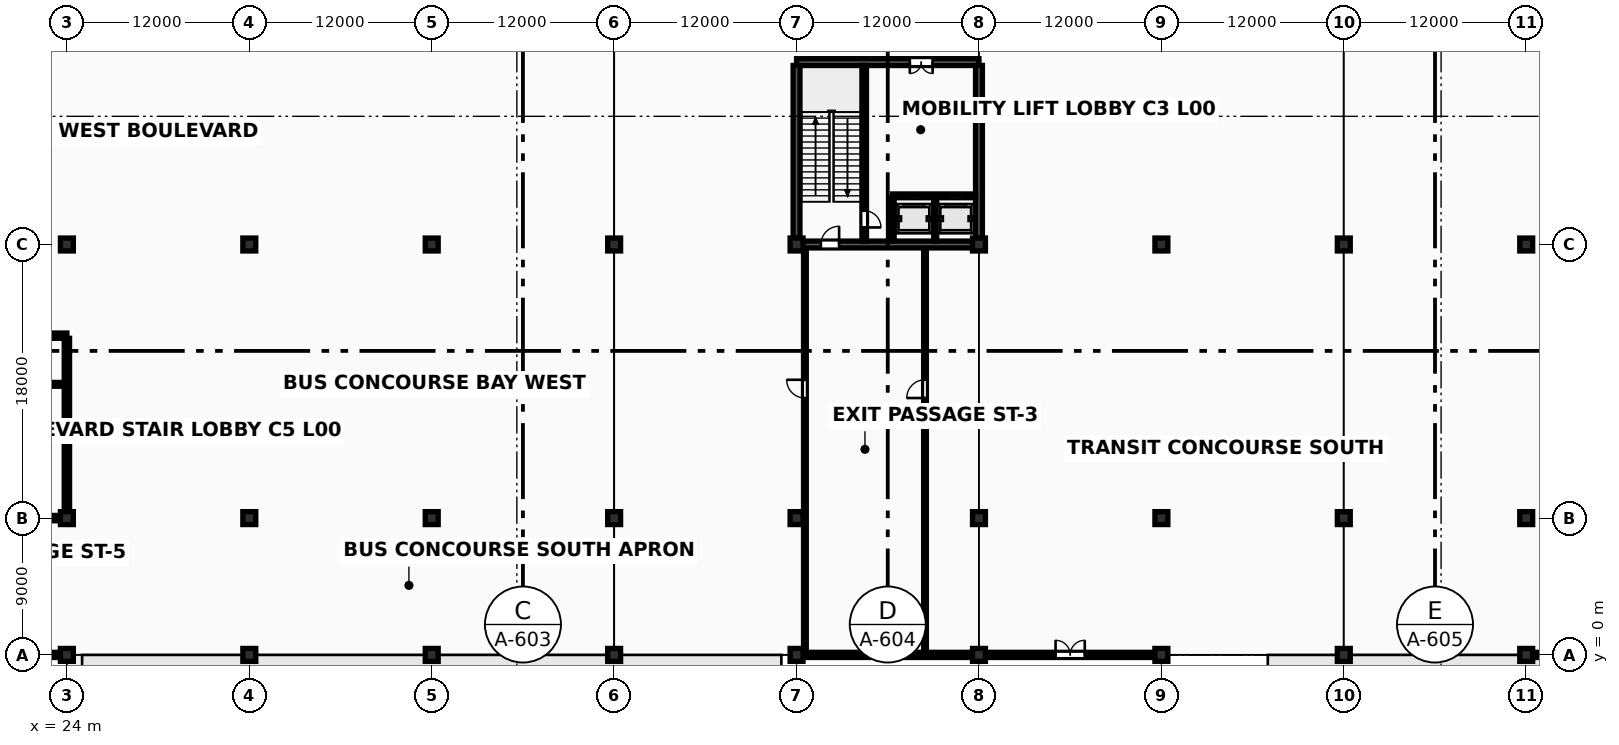
"""IFC4 building model, lengths in metres.
Left out: names, types, materials, properties, quantities, classifications, styles, units other than length and angle.
Written with IfcOpenShell. Run it as: python <this file> out.ifc"""

import sys

from ifc_helpers import new_model, si_unit, direction, frame, frame_2d, origin, origin_2d, place, context, subcontext, project, spatial, rectangle, circle, extrude, element, fill, save


model = new_model("IFC4")
c1 = context("Model", 3, precision=1e-05, world=origin(), true_north=direction((0.0, 1.0)))
c2 = subcontext(c1, "Body", "Model", "MODEL_VIEW")
j1 = project(units=[si_unit("LENGTHUNIT", "METRE"), si_unit("PLANEANGLEUNIT", "RADIAN")], contexts=[c1])
p1 = place(None, origin())
s1 = spatial("IfcSite", under=j1, at=p1, CompositionType="ELEMENT")
p2 = place(p1, origin())
s2 = spatial("IfcBuilding", under=s1, at=p2, CompositionType="ELEMENT")
p3 = place(p2, origin())
s3 = spatial("IfcBuildingStorey", under=s2, at=p3, CompositionType="ELEMENT", Elevation=0.0)
p4 = place(p3, frame((24.0, 0.0, 0.0), z_axis=(0.0, 0.0, 1.0), x_axis=(1.0, 0.0, 0.0)))
e1 = element("IfcColumn", 1, at=p4, inside=s3, PredefinedType="COLUMN", context=c2, shape_type="SweptSolid", body=[
    extrude(circle(Radius=0.425, at=origin_2d()), origin(), (0.0, 0.0, 1.0), 5.4),
])
for number, where, z_axis, x_axis in (
    (2, (24.0, 9.0, 0.0), (0.0, 0.0, 1.0), (1.0, 0.0, 0.0)),
    (3, (24.0, 27.0, 0.0), (0.0, 0.0, 1.0), (1.0, 0.0, 0.0)),
):
    element("IfcColumn", number, at=place(p3, frame(where, z_axis=z_axis, x_axis=x_axis)), inside=s3, PredefinedType="COLUMN", context=c2, shape_type="SweptSolid", body=[
        extrude(rectangle(XDim=0.85, YDim=0.85, at=origin_2d()), origin(), (0.0, 0.0, 1.0), 5.4),
    ])
p5 = place(p3, frame((36.0, 0.0, 0.0), z_axis=(0.0, 0.0, 1.0), x_axis=(1.0, 0.0, 0.0)))
e4 = element("IfcColumn", 4, at=p5, inside=s3, PredefinedType="COLUMN", context=c2, shape_type="SweptSolid", body=[
    extrude(circle(Radius=0.425, at=origin_2d()), origin(), (0.0, 0.0, 1.0), 5.4),
])
for number, where, z_axis, x_axis in (
    (5, (36.0, 9.0, 0.0), (0.0, 0.0, 1.0), (1.0, 0.0, 0.0)),
    (6, (36.0, 27.0, 0.0), (0.0, 0.0, 1.0), (1.0, 0.0, 0.0)),
):
    element("IfcColumn", number, at=place(p3, frame(where, z_axis=z_axis, x_axis=x_axis)), inside=s3, PredefinedType="COLUMN", context=c2, shape_type="SweptSolid", body=[
        extrude(rectangle(XDim=0.85, YDim=0.85, at=origin_2d()), origin(), (0.0, 0.0, 1.0), 5.4),
    ])
p6 = place(p3, frame((48.0, 0.0, 0.0), z_axis=(0.0, 0.0, 1.0), x_axis=(1.0, 0.0, 0.0)))
e7 = element("IfcColumn", 7, at=p6, inside=s3, PredefinedType="COLUMN", context=c2, shape_type="SweptSolid", body=[
    extrude(circle(Radius=0.425, at=origin_2d()), origin(), (0.0, 0.0, 1.0), 5.4),
])
for number, where, z_axis, x_axis in (
    (8, (48.0, 9.0, 0.0), (0.0, 0.0, 1.0), (1.0, 0.0, 0.0)),
    (9, (48.0, 27.0, 0.0), (0.0, 0.0, 1.0), (1.0, 0.0, 0.0)),
):
    element("IfcColumn", number, at=place(p3, frame(where, z_axis=z_axis, x_axis=x_axis)), inside=s3, PredefinedType="COLUMN", context=c2, shape_type="SweptSolid", body=[
        extrude(rectangle(XDim=0.85, YDim=0.85, at=origin_2d()), origin(), (0.0, 0.0, 1.0), 5.4),
    ])
p7 = place(p3, frame((60.0, 0.0, 0.0), z_axis=(0.0, 0.0, 1.0), x_axis=(1.0, 0.0, 0.0)))
e10 = element("IfcColumn", 10, at=p7, inside=s3, PredefinedType="COLUMN", context=c2, shape_type="SweptSolid", body=[
    extrude(circle(Radius=0.425, at=origin_2d()), origin(), (0.0, 0.0, 1.0), 5.4),
])
for number, where, z_axis, x_axis in (
    (11, (60.0, 9.0, 0.0), (0.0, 0.0, 1.0), (1.0, 0.0, 0.0)),
    (12, (60.0, 27.0, 0.0), (0.0, 0.0, 1.0), (1.0, 0.0, 0.0)),
):
    element("IfcColumn", number, at=place(p3, frame(where, z_axis=z_axis, x_axis=x_axis)), inside=s3, PredefinedType="COLUMN", context=c2, shape_type="SweptSolid", body=[
        extrude(rectangle(XDim=0.85, YDim=0.85, at=origin_2d()), origin(), (0.0, 0.0, 1.0), 5.4),
    ])
p8 = place(p3, frame((72.0, 0.0, 0.0), z_axis=(0.0, 0.0, 1.0), x_axis=(1.0, 0.0, 0.0)))
e13 = element("IfcColumn", 13, at=p8, inside=s3, PredefinedType="COLUMN", context=c2, shape_type="SweptSolid", body=[
    extrude(circle(Radius=0.425, at=origin_2d()), origin(), (0.0, 0.0, 1.0), 5.4),
])
for number, where, z_axis, x_axis in (
    (14, (72.0, 9.0, 0.0), (0.0, 0.0, 1.0), (1.0, 0.0, 0.0)),
    (15, (72.0, 27.0, 0.0), (0.0, 0.0, 1.0), (1.0, 0.0, 0.0)),
):
    element("IfcColumn", number, at=place(p3, frame(where, z_axis=z_axis, x_axis=x_axis)), inside=s3, PredefinedType="COLUMN", context=c2, shape_type="SweptSolid", body=[
        extrude(rectangle(XDim=0.85, YDim=0.85, at=origin_2d()), origin(), (0.0, 0.0, 1.0), 5.4),
    ])
p9 = place(p3, frame((84.0, 0.0, 0.0), z_axis=(0.0, 0.0, 1.0), x_axis=(1.0, 0.0, 0.0)))
e16 = element("IfcColumn", 16, at=p9, inside=s3, PredefinedType="COLUMN", context=c2, shape_type="SweptSolid", body=[
    extrude(circle(Radius=0.425, at=origin_2d()), origin(), (0.0, 0.0, 1.0), 5.4),
])
for number, where, z_axis, x_axis in (
    (17, (84.0, 9.0, 0.0), (0.0, 0.0, 1.0), (1.0, 0.0, 0.0)),
    (18, (84.0, 27.0, 0.0), (0.0, 0.0, 1.0), (1.0, 0.0, 0.0)),
):
    element("IfcColumn", number, at=place(p3, frame(where, z_axis=z_axis, x_axis=x_axis)), inside=s3, PredefinedType="COLUMN", context=c2, shape_type="SweptSolid", body=[
        extrude(rectangle(XDim=0.85, YDim=0.85, at=origin_2d()), origin(), (0.0, 0.0, 1.0), 5.4),
    ])
p10 = place(p3, frame((96.0, 0.0, 0.0), z_axis=(0.0, 0.0, 1.0), x_axis=(1.0, 0.0, 0.0)))
e19 = element("IfcColumn", 19, at=p10, inside=s3, PredefinedType="COLUMN", context=c2, shape_type="SweptSolid", body=[
    extrude(circle(Radius=0.425, at=origin_2d()), origin(), (0.0, 0.0, 1.0), 5.4),
])
for number, where, z_axis, x_axis in (
    (20, (96.0, 9.0, 0.0), (0.0, 0.0, 1.0), (1.0, 0.0, 0.0)),
    (21, (96.0, 27.0, 0.0), (0.0, 0.0, 1.0), (1.0, 0.0, 0.0)),
):
    element("IfcColumn", number, at=place(p3, frame(where, z_axis=z_axis, x_axis=x_axis)), inside=s3, PredefinedType="COLUMN", context=c2, shape_type="SweptSolid", body=[
        extrude(rectangle(XDim=0.85, YDim=0.85, at=origin_2d()), origin(), (0.0, 0.0, 1.0), 5.4),
    ])
p11 = place(p3, frame((108.0, 0.0, 0.0), z_axis=(0.0, 0.0, 1.0), x_axis=(1.0, 0.0, 0.0)))
e22 = element("IfcColumn", 22, at=p11, inside=s3, PredefinedType="COLUMN", context=c2, shape_type="SweptSolid", body=[
    extrude(circle(Radius=0.425, at=origin_2d()), origin(), (0.0, 0.0, 1.0), 5.4),
])
for number, where, z_axis, x_axis in (
    (23, (108.0, 9.0, 0.0), (0.0, 0.0, 1.0), (1.0, 0.0, 0.0)),
    (24, (108.0, 27.0, 0.0), (0.0, 0.0, 1.0), (1.0, 0.0, 0.0)),
):
    element("IfcColumn", number, at=place(p3, frame(where, z_axis=z_axis, x_axis=x_axis)), inside=s3, PredefinedType="COLUMN", context=c2, shape_type="SweptSolid", body=[
        extrude(rectangle(XDim=0.85, YDim=0.85, at=origin_2d()), origin(), (0.0, 0.0, 1.0), 5.4),
    ])
p12 = place(p3, frame((120.0, 0.0, 0.0), z_axis=(0.0, 0.0, 1.0), x_axis=(1.0, 0.0, 0.0)))
e25 = element("IfcColumn", 25, at=p12, inside=s3, PredefinedType="COLUMN", context=c2, shape_type="SweptSolid", body=[
    extrude(circle(Radius=0.425, at=origin_2d()), origin(), (0.0, 0.0, 1.0), 5.4),
])
for number, where, z_axis, x_axis in (
    (26, (120.0, 9.0, 0.0), (0.0, 0.0, 1.0), (1.0, 0.0, 0.0)),
    (27, (120.0, 27.0, 0.0), (0.0, 0.0, 1.0), (1.0, 0.0, 0.0)),
):
    element("IfcColumn", number, at=place(p3, frame(where, z_axis=z_axis, x_axis=x_axis)), inside=s3, PredefinedType="COLUMN", context=c2, shape_type="SweptSolid", body=[
        extrude(rectangle(XDim=0.85, YDim=0.85, at=origin_2d()), origin(), (0.0, 0.0, 1.0), 5.4),
    ])
p13 = place(p3, frame((72.422, 27.0, 0.0), z_axis=(0.0, 0.0, 1.0), x_axis=(1.0, 0.0, 0.0)))
e28 = element("IfcWall", 28, at=p13, inside=s3, PredefinedType="SHEAR", context=c2, shape_type="SweptSolid", body=[
    extrude(rectangle(XDim=11.156, YDim=0.45, at=frame_2d((5.578, 0.0))), origin(), (0.0, 0.0, 1.0), 5.203),
])
p14 = place(p13, frame((1.178, 0.0, 0.0)))
e29 = element("IfcOpeningElement", 29, at=p14, cuts=e28, PredefinedType="OPENING", context=c2, shape_type="SweptSolid", body=[
    extrude(rectangle(XDim=1.2, YDim=2.2, at=frame_2d((0.6, 1.1))), frame((0.0, 0.24, 0.0), z_axis=(0.0, -1.0, 0.0), x_axis=(1.0, 0.0, 0.0)), (0.0, 0.0, 1.0), 0.48),
])
p15 = place(p3, frame((72.0, 39.0, 0.0), z_axis=(0.0, 0.0, 1.0), x_axis=(1.0, 0.0, 0.0)))
e30 = element("IfcWall", 30, at=p15, inside=s3, PredefinedType="SHEAR", context=c2, shape_type="SweptSolid", body=[
    extrude(rectangle(XDim=12.0, YDim=0.45, at=frame_2d((6.0, 0.0))), origin(), (0.0, 0.0, 1.0), 5.203),
])
p16 = place(p15, frame((7.45, 0.0, 0.0)))
e31 = element("IfcOpeningElement", 31, at=p16, cuts=e30, PredefinedType="OPENING", context=c2, shape_type="SweptSolid", body=[
    extrude(rectangle(XDim=1.5, YDim=2.25, at=frame_2d((0.75, 1.125))), frame((0.0, 0.24, 0.0), z_axis=(0.0, -1.0, 0.0), x_axis=(1.0, 0.0, 0.0)), (0.0, 0.0, 1.0), 0.48),
])
for number, where, z_axis, x_axis in (
    (32, (72.0, 27.422, 0.0), (0.0, 0.0, 1.0), (0.0, 1.0, 0.0)),
    (33, (84.0, 27.422, 0.0), (0.0, 0.0, 1.0), (0.0, 1.0, 0.0)),
):
    element("IfcWall", number, at=place(p3, frame(where, z_axis=z_axis, x_axis=x_axis)), inside=s3, PredefinedType="SHEAR", context=c2, shape_type="SweptSolid", body=[
        extrude(rectangle(XDim=11.356, YDim=0.45, at=frame_2d((5.678, 0.0))), origin(), (0.0, 0.0, 1.0), 5.203),
    ])
p17 = place(p3, frame((76.45, 27.222, 0.0), z_axis=(0.0, 0.0, 1.0), x_axis=(0.0, 1.0, 0.0)))
e34 = element("IfcWall", 34, at=p17, inside=s3, PredefinedType="SHEAR", context=c2, shape_type="SweptSolid", body=[
    extrude(rectangle(XDim=11.556, YDim=0.3, at=frame_2d((5.778, 0.0))), origin(), (0.0, 0.0, 1.0), 5.203),
])
p18 = place(p17, frame((0.9, 0.0, 0.0)))
e35 = element("IfcOpeningElement", 35, at=p18, cuts=e34, PredefinedType="OPENING", context=c2, shape_type="SweptSolid", body=[
    extrude(rectangle(XDim=1.1, YDim=2.2, at=frame_2d((0.55, 1.1))), frame((0.0, 0.165, 0.0), z_axis=(0.0, -1.0, 0.0), x_axis=(1.0, 0.0, 0.0)), (0.0, 0.0, 1.0), 0.33),
])
p19 = place(p3, frame((78.32, 30.2, 0.0), z_axis=(0.0, 0.0, 1.0), x_axis=(1.0, 0.0, 0.0)))
e36 = element("IfcWall", 36, at=p19, inside=s3, PredefinedType="SOLIDWALL", context=c2, shape_type="SweptSolid", body=[
    extrude(rectangle(XDim=5.458, YDim=0.25, at=frame_2d((2.729, 0.0))), origin(), (0.0, 0.0, 1.0), 5.203),
])
p20 = place(p19, frame((0.86, 0.0, 0.0)))
e37 = element("IfcOpeningElement", 37, at=p20, cuts=e36, PredefinedType="OPENING", context=c2, shape_type="SweptSolid", body=[
    extrude(rectangle(XDim=1.08, YDim=2.22, at=frame_2d((0.54, 1.11))), frame((0.0, 0.14, 0.0), z_axis=(0.0, -1.0, 0.0), x_axis=(1.0, 0.0, 0.0)), (0.0, 0.0, 1.0), 0.28),
])
p21 = place(p19, frame((3.61, 0.0, 0.0)))
e38 = element("IfcOpeningElement", 38, at=p21, cuts=e36, PredefinedType="OPENING", context=c2, shape_type="SweptSolid", body=[
    extrude(rectangle(XDim=1.08, YDim=2.22, at=frame_2d((0.54, 1.11))), frame((0.0, 0.14, 0.0), z_axis=(0.0, -1.0, 0.0), x_axis=(1.0, 0.0, 0.0)), (0.0, 0.0, 1.0), 0.28),
])
for number, where, z_axis, x_axis in (
    (39, (78.32, 27.225, 0.0), (0.0, 0.0, 1.0), (0.0, 1.0, 0.0)),
    (40, (81.12, 27.225, 0.0), (0.0, 0.0, 1.0), (0.0, 1.0, 0.0)),
):
    element("IfcWall", number, at=place(p3, frame(where, z_axis=z_axis, x_axis=x_axis)), inside=s3, PredefinedType="SOLIDWALL", context=c2, shape_type="SweptSolid", body=[
        extrude(rectangle(XDim=2.855, YDim=0.2, at=frame_2d((1.427, 0.0))), origin(), (0.0, 0.0, 1.0), 5.193),
    ])
p22 = place(p3, frame((12.422, 9.0, 0.0), z_axis=(0.0, 0.0, 1.0), x_axis=(1.0, 0.0, 0.0)))
e41 = element("IfcWall", 41, at=p22, inside=s3, PredefinedType="SHEAR", context=c2, shape_type="SweptSolid", body=[
    extrude(rectangle(XDim=11.156, YDim=0.35, at=frame_2d((5.578, 0.0))), origin(), (0.0, 0.0, 1.0), 5.203),
])
p23 = place(p22, frame((1.178, 0.0, 0.0)))
e42 = element("IfcOpeningElement", 42, at=p23, cuts=e41, PredefinedType="OPENING", context=c2, shape_type="SweptSolid", body=[
    extrude(rectangle(XDim=1.2, YDim=2.2, at=frame_2d((0.6, 1.1))), frame((0.0, 0.19, 0.0), z_axis=(0.0, -1.0, 0.0), x_axis=(1.0, 0.0, 0.0)), (0.0, 0.0, 1.0), 0.38),
])
p24 = place(p3, frame((12.0, 21.0, 0.0), z_axis=(0.0, 0.0, 1.0), x_axis=(1.0, 0.0, 0.0)))
e43 = element("IfcWall", 43, at=p24, inside=s3, PredefinedType="SHEAR", context=c2, shape_type="SweptSolid", body=[
    extrude(rectangle(XDim=12.0, YDim=0.35, at=frame_2d((6.0, 0.0))), origin(), (0.0, 0.0, 1.0), 5.203),
])
p25 = place(p24, frame((7.45, 0.0, 0.0)))
e44 = element("IfcOpeningElement", 44, at=p25, cuts=e43, PredefinedType="OPENING", context=c2, shape_type="SweptSolid", body=[
    extrude(rectangle(XDim=1.4, YDim=2.22, at=frame_2d((0.7, 1.11))), frame((0.0, 0.19, 0.0), z_axis=(0.0, -1.0, 0.0), x_axis=(1.0, 0.0, 0.0)), (0.0, 0.0, 1.0), 0.38),
])
p26 = place(p3, frame((24.0, 9.422, 0.0), z_axis=(0.0, 0.0, 1.0), x_axis=(0.0, 1.0, 0.0)))
e45 = element("IfcWall", 45, at=p26, inside=s3, PredefinedType="SHEAR", context=c2, shape_type="SweptSolid", body=[
    extrude(rectangle(XDim=11.406, YDim=0.35, at=frame_2d((5.703, 0.0))), origin(), (0.0, 0.0, 1.0), 5.203),
])
p27 = place(p3, frame((16.597, 17.8, 0.0), z_axis=(0.0, 0.0, 1.0), x_axis=(1.0, 0.0, 0.0)))
e46 = element("IfcWall", 46, at=p27, inside=s3, PredefinedType="SOLIDWALL", context=c2, shape_type="SweptSolid", body=[
    extrude(rectangle(XDim=7.231, YDim=0.25, at=frame_2d((3.615, 0.0))), origin(), (0.0, 0.0, 1.0), 5.203),
])
p28 = place(p3, frame((12.423, 0.0, 0.0), z_axis=(0.0, 0.0, 1.0), x_axis=(1.0, 0.0, 0.0)))
e47 = element("IfcWall", 47, at=p28, inside=s3, PredefinedType="SOLIDWALL", context=c2, shape_type="SweptSolid", body=[
    extrude(rectangle(XDim=11.154, YDim=0.34, at=frame_2d((5.577, 0.0))), origin(), (0.0, 0.0, 1.0), 3.85),
])
p29 = place(p28, frame((4.697, 0.0, 0.0)))
e48 = element("IfcOpeningElement", 48, at=p29, cuts=e47, PredefinedType="OPENING", context=c2, shape_type="SweptSolid", body=[
    extrude(rectangle(XDim=1.76, YDim=2.36, at=frame_2d((0.88, 1.18))), frame((0.0, 0.185, 0.0), z_axis=(0.0, -1.0, 0.0), x_axis=(1.0, 0.0, 0.0)), (0.0, 0.0, 1.0), 0.37),
])
p30 = place(p3, frame((72.423, 0.0, 0.0), z_axis=(0.0, 0.0, 1.0), x_axis=(1.0, 0.0, 0.0)))
e49 = element("IfcWall", 49, at=p30, inside=s3, PredefinedType="SOLIDWALL", context=c2, shape_type="SweptSolid", body=[
    extrude(rectangle(XDim=11.154, YDim=0.34, at=frame_2d((5.577, 0.0))), origin(), (0.0, 0.0, 1.0), 3.85),
])
p31 = place(p30, frame((4.697, 0.0, 0.0)))
e50 = element("IfcOpeningElement", 50, at=p31, cuts=e49, PredefinedType="OPENING", context=c2, shape_type="SweptSolid", body=[
    extrude(rectangle(XDim=1.76, YDim=2.36, at=frame_2d((0.88, 1.18))), frame((0.0, 0.185, 0.0), z_axis=(0.0, -1.0, 0.0), x_axis=(1.0, 0.0, 0.0)), (0.0, 0.0, 1.0), 0.37),
])
p32 = place(p3, frame((84.423, 0.0, 0.0), z_axis=(0.0, 0.0, 1.0), x_axis=(1.0, 0.0, 0.0)))
e51 = element("IfcWall", 51, at=p32, inside=s3, PredefinedType="SOLIDWALL", context=c2, shape_type="SweptSolid", body=[
    extrude(rectangle(XDim=11.154, YDim=0.34, at=frame_2d((5.577, 0.0))), origin(), (0.0, 0.0, 1.0), 3.85),
])
p33 = place(p32, frame((4.617, 0.0, 0.0)))
e52 = element("IfcOpeningElement", 52, at=p33, cuts=e51, PredefinedType="OPENING", context=c2, shape_type="SweptSolid", body=[
    extrude(rectangle(XDim=1.92, YDim=2.4, at=frame_2d((0.96, 1.2))), frame((0.0, 0.185, 0.0), z_axis=(0.0, -1.0, 0.0), x_axis=(1.0, 0.0, 0.0)), (0.0, 0.0, 1.0), 0.37),
])
p34 = place(p3, frame((120.423, 0.0, 0.0), z_axis=(0.0, 0.0, 1.0), x_axis=(1.0, 0.0, 0.0)))
e53 = element("IfcWall", 53, at=p34, inside=s3, PredefinedType="SOLIDWALL", context=c2, shape_type="SweptSolid", body=[
    extrude(rectangle(XDim=11.154, YDim=0.34, at=frame_2d((5.577, 0.0))), origin(), (0.0, 0.0, 1.0), 3.85),
])
p35 = place(p34, frame((4.377, 0.0, 0.0)))
e54 = element("IfcOpeningElement", 54, at=p35, cuts=e53, PredefinedType="OPENING", context=c2, shape_type="SweptSolid", body=[
    extrude(rectangle(XDim=2.4, YDim=2.54, at=frame_2d((1.2, 1.27))), frame((0.0, 0.185, 0.0), z_axis=(0.0, -1.0, 0.0), x_axis=(1.0, 0.0, 0.0)), (0.0, 0.0, 1.0), 0.37),
])
p36 = place(p3, frame((72.55, 0.4, 0.0), z_axis=(0.0, 0.0, 1.0), x_axis=(0.0, 1.0, 0.0)))
e55 = element("IfcWall", 55, at=p36, inside=s3, PredefinedType="SOLIDWALL", context=c2, shape_type="SweptSolid", body=[
    extrude(rectangle(XDim=26.3, YDim=0.18, at=frame_2d((13.15, 0.0))), origin(), (0.0, 0.0, 1.0), 2.6),
])
p37 = place(p36, frame((16.5, 0.0, 0.0)))
e56 = element("IfcOpeningElement", 56, at=p37, cuts=e55, PredefinedType="OPENING", context=c2, shape_type="SweptSolid", body=[
    extrude(rectangle(XDim=1.2, YDim=2.2, at=frame_2d((0.6, 1.1))), frame((0.0, 0.105, 0.0), z_axis=(0.0, -1.0, 0.0), x_axis=(1.0, 0.0, 0.0)), (0.0, 0.0, 1.0), 0.21),
])
p38 = place(p3, frame((80.45, 0.4, 0.0), z_axis=(0.0, 0.0, 1.0), x_axis=(0.0, 1.0, 0.0)))
e57 = element("IfcWall", 57, at=p38, inside=s3, PredefinedType="SOLIDWALL", context=c2, shape_type="SweptSolid", body=[
    extrude(rectangle(XDim=26.3, YDim=0.18, at=frame_2d((13.15, 0.0))), origin(), (0.0, 0.0, 1.0), 2.6),
])
p39 = place(p38, frame((16.5, 0.0, 0.0)))
e58 = element("IfcOpeningElement", 58, at=p39, cuts=e57, PredefinedType="OPENING", context=c2, shape_type="SweptSolid", body=[
    extrude(rectangle(XDim=1.2, YDim=2.2, at=frame_2d((0.6, 1.1))), frame((0.0, 0.105, 0.0), z_axis=(0.0, -1.0, 0.0), x_axis=(1.0, 0.0, 0.0)), (0.0, 0.0, 1.0), 0.21),
])
p40 = place(p31, frame((1.76, 0.0, 0.0), z_axis=(0.0, 0.0, 1.0), x_axis=(-1.0, 0.0, 0.0)))
e59 = element("IfcDoor", 59, at=p40, inside=s3, OperationType="DOUBLE_DOOR_SINGLE_SWING", PredefinedType="DOOR", context=c2, shape_type="SweptSolid", body=[
    extrude(rectangle(XDim=1.76, YDim=2.36, at=frame_2d((0.88, 1.18))), frame((0.0, 0.025, 0.0), z_axis=(0.0, -1.0, 0.0), x_axis=(1.0, 0.0, 0.0)), (0.0, 0.0, 1.0), 0.05),
])
fill(e50, e59)
p41 = place(p33, frame((1.92, 0.0, 0.0), z_axis=(0.0, 0.0, 1.0), x_axis=(-1.0, 0.0, 0.0)))
e60 = element("IfcDoor", 60, at=p41, inside=s3, OperationType="DOUBLE_DOOR_SINGLE_SWING", PredefinedType="DOOR", context=c2, shape_type="SweptSolid", body=[
    extrude(rectangle(XDim=1.92, YDim=2.4, at=frame_2d((0.96, 1.2))), frame((0.0, 0.025, 0.0), z_axis=(0.0, -1.0, 0.0), x_axis=(1.0, 0.0, 0.0)), (0.0, 0.0, 1.0), 0.05),
])
fill(e52, e60)
p42 = place(p18, origin())
e61 = element("IfcDoor", 61, at=p42, inside=s3, OperationType="SINGLE_SWING_LEFT", PredefinedType="DOOR", context=c2, shape_type="SweptSolid", body=[
    extrude(rectangle(XDim=1.1, YDim=2.2, at=frame_2d((0.55, 1.1))), frame((0.0, 0.025, 0.0), z_axis=(0.0, -1.0, 0.0), x_axis=(1.0, 0.0, 0.0)), (0.0, 0.0, 1.0), 0.05),
])
fill(e35, e61)
p43 = place(p16, origin())
e62 = element("IfcDoor", 62, at=p43, inside=s3, OperationType="DOUBLE_DOOR_SINGLE_SWING", PredefinedType="DOOR", context=c2, shape_type="SweptSolid", body=[
    extrude(rectangle(XDim=1.5, YDim=2.25, at=frame_2d((0.75, 1.125))), frame((0.0, 0.025, 0.0), z_axis=(0.0, -1.0, 0.0), x_axis=(1.0, 0.0, 0.0)), (0.0, 0.0, 1.0), 0.05),
])
fill(e31, e62)
p44 = place(p14, frame((1.2, 0.0, 0.0), z_axis=(0.0, 0.0, 1.0), x_axis=(-1.0, 0.0, 0.0)))
e63 = element("IfcDoor", 63, at=p44, inside=s3, OperationType="SINGLE_SWING_RIGHT", PredefinedType="DOOR", context=c2, shape_type="SweptSolid", body=[
    extrude(rectangle(XDim=1.2, YDim=2.2, at=frame_2d((0.6, 1.1))), frame((0.0, 0.025, 0.0), z_axis=(0.0, -1.0, 0.0), x_axis=(1.0, 0.0, 0.0)), (0.0, 0.0, 1.0), 0.05),
])
fill(e29, e63)
p45 = place(p20, origin())
e64 = element("IfcDoor", 64, at=p45, inside=s3, OperationType="SLIDING_TO_LEFT", PredefinedType="USERDEFINED", context=c2, shape_type="SweptSolid", body=[
    extrude(rectangle(XDim=1.08, YDim=2.22, at=frame_2d((0.54, 1.11))), frame((0.0, 0.025, 0.0), z_axis=(0.0, -1.0, 0.0), x_axis=(1.0, 0.0, 0.0)), (0.0, 0.0, 1.0), 0.05),
])
fill(e37, e64)
p46 = place(p21, origin())
e65 = element("IfcDoor", 65, at=p46, inside=s3, OperationType="SLIDING_TO_LEFT", PredefinedType="USERDEFINED", context=c2, shape_type="SweptSolid", body=[
    extrude(rectangle(XDim=1.08, YDim=2.22, at=frame_2d((0.54, 1.11))), frame((0.0, 0.025, 0.0), z_axis=(0.0, -1.0, 0.0), x_axis=(1.0, 0.0, 0.0)), (0.0, 0.0, 1.0), 0.05),
])
fill(e38, e65)
p47 = place(p37, frame((1.2, 0.0, 0.0), z_axis=(0.0, 0.0, 1.0), x_axis=(-1.0, 0.0, 0.0)))
e66 = element("IfcDoor", 66, at=p47, inside=s3, OperationType="SINGLE_SWING_RIGHT", PredefinedType="DOOR", context=c2, shape_type="SweptSolid", body=[
    extrude(rectangle(XDim=1.2, YDim=2.2, at=frame_2d((0.6, 1.1))), frame((0.0, 0.025, 0.0), z_axis=(0.0, -1.0, 0.0), x_axis=(1.0, 0.0, 0.0)), (0.0, 0.0, 1.0), 0.05),
])
fill(e56, e66)
p48 = place(p39, frame((1.2, 0.0, 0.0), z_axis=(0.0, 0.0, 1.0), x_axis=(-1.0, 0.0, 0.0)))
e67 = element("IfcDoor", 67, at=p48, inside=s3, OperationType="SINGLE_SWING_LEFT", PredefinedType="DOOR", context=c2, shape_type="SweptSolid", body=[
    extrude(rectangle(XDim=1.2, YDim=2.2, at=frame_2d((0.6, 1.1))), frame((0.0, 0.025, 0.0), z_axis=(0.0, -1.0, 0.0), x_axis=(1.0, 0.0, 0.0)), (0.0, 0.0, 1.0), 0.05),
])
fill(e58, e67)
save(model, sys.argv[1])
